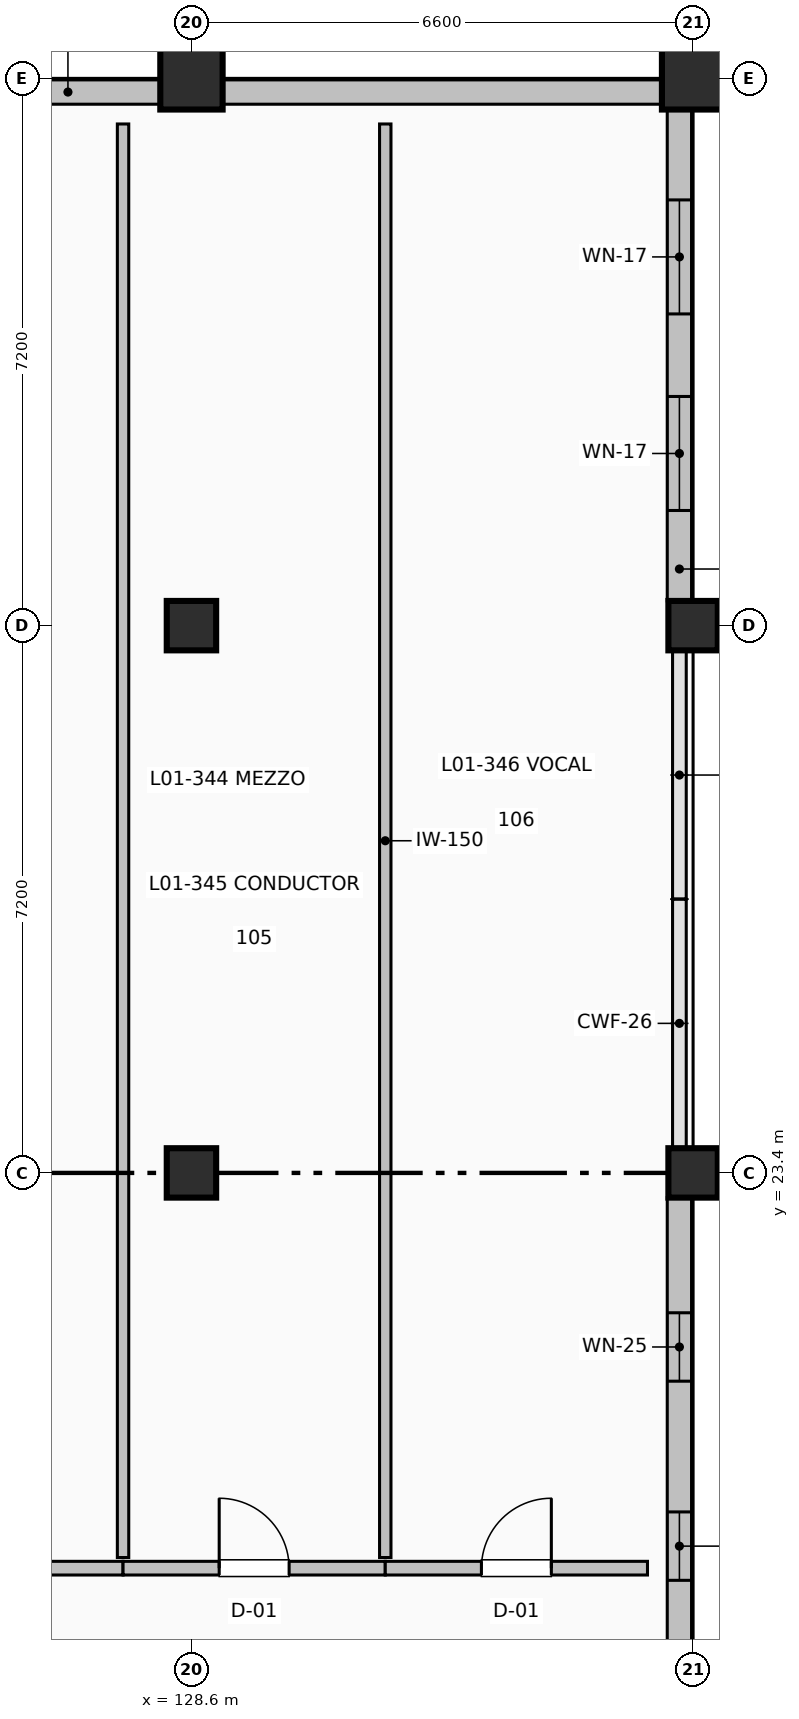
"""IFC4 building model, lengths in metres.
Left out: names, types, materials, properties, quantities, classifications, styles, units other than length and angle.
Written with IfcOpenShell. Run it as: python <this file> out.ifc"""

import sys

from ifc_helpers import new_model, si_unit, direction, frame, frame_2d, origin, origin_2d, place, context, subcontext, project, spatial, rectangle, extrude, element, fill, save


model = new_model("IFC4")
c1 = context("Model", 3, precision=1e-05, world=origin(), true_north=direction((0.0, 1.0)))
c2 = subcontext(c1, "Body", "Model", "MODEL_VIEW")
j1 = project(units=[si_unit("LENGTHUNIT", "METRE"), si_unit("PLANEANGLEUNIT", "RADIAN")], contexts=[c1])
p1 = place(None, origin())
s1 = spatial("IfcSite", under=j1, at=p1, CompositionType="ELEMENT")
p2 = place(p1, origin())
s2 = spatial("IfcBuilding", under=s1, at=p2, CompositionType="ELEMENT")
p3 = place(p2, frame((0.0, 0.0, 5.4)))
s3 = spatial("IfcBuildingStorey", under=s2, at=p3, CompositionType="ELEMENT", Elevation=5.4)
for number, where, z_axis, x_axis in (
    (1, (128.6, 23.4, 0.0), (0.0, 0.0, 1.0), (1.0, 0.0, 0.0)),
    (2, (128.6, 30.6, 0.0), (0.0, 0.0, 1.0), (1.0, 0.0, 0.0)),
):
    element("IfcColumn", number, at=place(p3, frame(where, z_axis=z_axis, x_axis=x_axis)), inside=s3, PredefinedType="COLUMN", context=c2, shape_type="SweptSolid", body=[
        extrude(rectangle(XDim=0.65, YDim=0.65, at=origin_2d()), origin(), (0.0, 0.0, 1.0), 4.8),
    ])
p4 = place(p3, frame((128.6, 37.8, 0.0), z_axis=(0.0, 0.0, 1.0), x_axis=(1.0, 0.0, 0.0)))
e3 = element("IfcColumn", 3, at=p4, inside=s3, PredefinedType="COLUMN", context=c2, shape_type="SweptSolid", body=[
    extrude(rectangle(XDim=0.82, YDim=0.82, at=origin_2d()), origin(), (0.0, 0.0, 1.0), 4.8),
])
for number, where, z_axis, x_axis in (
    (4, (135.2, 23.4, 0.0), (0.0, 0.0, 1.0), (1.0, 0.0, 0.0)),
    (5, (135.2, 30.6, 0.0), (0.0, 0.0, 1.0), (1.0, 0.0, 0.0)),
):
    element("IfcColumn", number, at=place(p3, frame(where, z_axis=z_axis, x_axis=x_axis)), inside=s3, PredefinedType="COLUMN", context=c2, shape_type="SweptSolid", body=[
        extrude(rectangle(XDim=0.65, YDim=0.65, at=origin_2d()), origin(), (0.0, 0.0, 1.0), 4.8),
    ])
p5 = place(p3, frame((135.2, 37.8, 0.0), z_axis=(0.0, 0.0, 1.0), x_axis=(1.0, 0.0, 0.0)))
e6 = element("IfcColumn", 6, at=p5, inside=s3, PredefinedType="COLUMN", context=c2, shape_type="SweptSolid", body=[
    extrude(rectangle(XDim=0.82, YDim=0.82, at=origin_2d()), origin(), (0.0, 0.0, 1.0), 4.8),
])
p6 = place(p3, frame((135.02, 37.39, 0.0), z_axis=(0.0, 0.0, 1.0), x_axis=(0.0, -1.0, 0.0)))
e7 = element("IfcWall", 7, at=p6, inside=s3, PredefinedType="SOLIDWALL", context=c2, shape_type="SweptSolid", body=[
    extrude(rectangle(XDim=6.465, YDim=0.32, at=frame_2d((3.232, 0.0))), origin(), (0.0, 0.0, 1.0), 3.742),
])
p7 = place(p6, frame((1.189, 0.0, 1.0)))
e8 = element("IfcOpeningElement", 8, at=p7, cuts=e7, PredefinedType="OPENING", context=c2, shape_type="SweptSolid", body=[
    extrude(rectangle(XDim=1.5, YDim=1.7, at=frame_2d((0.75, 0.85))), frame((0.0, 0.17, 0.0), z_axis=(0.0, -1.0, 0.0), x_axis=(1.0, 0.0, 0.0)), (0.0, 0.0, 1.0), 0.34),
])
p8 = place(p6, frame((3.775, 0.0, 1.0)))
e9 = element("IfcOpeningElement", 9, at=p8, cuts=e7, PredefinedType="OPENING", context=c2, shape_type="SweptSolid", body=[
    extrude(rectangle(XDim=1.5, YDim=1.7, at=frame_2d((0.75, 0.85))), frame((0.0, 0.17, 0.0), z_axis=(0.0, -1.0, 0.0), x_axis=(1.0, 0.0, 0.0)), (0.0, 0.0, 1.0), 0.34),
])
p9 = place(p3, frame((135.02, 23.075, 0.0), z_axis=(0.0, 0.0, 1.0), x_axis=(0.0, -1.0, 0.0)))
e10 = element("IfcWall", 10, at=p9, inside=s3, PredefinedType="SOLIDWALL", context=c2, shape_type="SweptSolid", body=[
    extrude(rectangle(XDim=6.55, YDim=0.32, at=frame_2d((3.275, 0.0))), origin(), (0.0, 0.0, 1.0), 3.742),
])
p10 = place(p9, frame((1.515, 0.0, 1.0)))
e11 = element("IfcOpeningElement", 11, at=p10, cuts=e10, PredefinedType="OPENING", context=c2, shape_type="SweptSolid", body=[
    extrude(rectangle(XDim=0.9, YDim=1.4, at=frame_2d((0.45, 0.7))), frame((0.0, 0.17, 0.0), z_axis=(0.0, -1.0, 0.0), x_axis=(1.0, 0.0, 0.0)), (0.0, 0.0, 1.0), 0.34),
])
p11 = place(p9, frame((4.135, 0.0, 1.0)))
e12 = element("IfcOpeningElement", 12, at=p11, cuts=e10, PredefinedType="OPENING", context=c2, shape_type="SweptSolid", body=[
    extrude(rectangle(XDim=0.9, YDim=1.4, at=frame_2d((0.45, 0.7))), frame((0.0, 0.17, 0.0), z_axis=(0.0, -1.0, 0.0), x_axis=(1.0, 0.0, 0.0)), (0.0, 0.0, 1.0), 0.34),
])
for number, where, z_axis, x_axis in (
    (13, (122.41, 37.62, 0.0), (0.0, 0.0, 1.0), (1.0, 0.0, 0.0)),
    (14, (129.01, 37.62, 0.0), (0.0, 0.0, 1.0), (1.0, 0.0, 0.0)),
):
    element("IfcWall", number, at=place(p3, frame(where, z_axis=z_axis, x_axis=x_axis)), inside=s3, PredefinedType="SOLIDWALL", context=c2, shape_type="SweptSolid", body=[
        extrude(rectangle(XDim=5.78, YDim=0.32, at=frame_2d((2.89, 0.0))), origin(), (0.0, 0.0, 1.0), 3.742),
    ])
p12 = place(p3, frame((124.25, 18.2, 0.0), z_axis=(0.0, 0.0, 1.0), x_axis=(1.0, 0.0, 0.0)))
e15 = element("IfcWall", 15, at=p12, inside=s3, PredefinedType="PARTITIONING", context=c2, shape_type="SweptSolid", body=[
    extrude(rectangle(XDim=3.45, YDim=0.18, at=frame_2d((1.725, 0.0))), origin(), (0.0, 0.0, 1.0), 4.492),
])
p13 = place(p12, frame((1.265, 0.0, 0.0)))
e16 = element("IfcOpeningElement", 16, at=p13, cuts=e15, PredefinedType="OPENING", context=c2, shape_type="SweptSolid", body=[
    extrude(rectangle(XDim=0.92, YDim=2.05, at=frame_2d((0.46, 1.025))), frame((0.0, 0.1, 0.0), z_axis=(0.0, -1.0, 0.0), x_axis=(1.0, 0.0, 0.0)), (0.0, 0.0, 1.0), 0.2),
])
p14 = place(p3, frame((127.7, 18.34, 0.0), z_axis=(0.0, 0.0, 1.0), x_axis=(0.0, 1.0, 0.0)))
e17 = element("IfcWall", 17, at=p14, inside=s3, PredefinedType="PARTITIONING", context=c2, shape_type="SweptSolid", body=[
    extrude(rectangle(XDim=18.86, YDim=0.15, at=frame_2d((9.43, 0.0))), origin(), (0.0, 0.0, 1.0), 4.492),
])
p15 = place(p3, frame((127.7, 18.2, 0.0), z_axis=(0.0, 0.0, 1.0), x_axis=(1.0, 0.0, 0.0)))
e18 = element("IfcWall", 18, at=p15, inside=s3, PredefinedType="PARTITIONING", context=c2, shape_type="SweptSolid", body=[
    extrude(rectangle(XDim=3.45, YDim=0.18, at=frame_2d((1.725, 0.0))), origin(), (0.0, 0.0, 1.0), 4.492),
])
p16 = place(p15, frame((1.265, 0.0, 0.0)))
e19 = element("IfcOpeningElement", 19, at=p16, cuts=e18, PredefinedType="OPENING", context=c2, shape_type="SweptSolid", body=[
    extrude(rectangle(XDim=0.92, YDim=2.05, at=frame_2d((0.46, 1.025))), frame((0.0, 0.1, 0.0), z_axis=(0.0, -1.0, 0.0), x_axis=(1.0, 0.0, 0.0)), (0.0, 0.0, 1.0), 0.2),
])
p17 = place(p3, frame((131.15, 18.34, 0.0), z_axis=(0.0, 0.0, 1.0), x_axis=(0.0, 1.0, 0.0)))
e20 = element("IfcWall", 20, at=p17, inside=s3, PredefinedType="PARTITIONING", context=c2, shape_type="SweptSolid", body=[
    extrude(rectangle(XDim=18.86, YDim=0.15, at=frame_2d((9.43, 0.0))), origin(), (0.0, 0.0, 1.0), 4.492),
])
p18 = place(p3, frame((131.15, 18.2, 0.0), z_axis=(0.0, 0.0, 1.0), x_axis=(1.0, 0.0, 0.0)))
e21 = element("IfcWall", 21, at=p18, inside=s3, PredefinedType="PARTITIONING", context=c2, shape_type="SweptSolid", body=[
    extrude(rectangle(XDim=3.45, YDim=0.18, at=frame_2d((1.725, 0.0))), origin(), (0.0, 0.0, 1.0), 4.492),
])
p19 = place(p18, frame((1.265, 0.0, 0.0)))
e22 = element("IfcOpeningElement", 22, at=p19, cuts=e21, PredefinedType="OPENING", context=c2, shape_type="SweptSolid", body=[
    extrude(rectangle(XDim=0.92, YDim=2.05, at=frame_2d((0.46, 1.025))), frame((0.0, 0.1, 0.0), z_axis=(0.0, -1.0, 0.0), x_axis=(1.0, 0.0, 0.0)), (0.0, 0.0, 1.0), 0.2),
])
p20 = place(p7, origin())
e23 = element("IfcWindow", 23, at=p20, inside=s3, PartitioningType="SINGLE_PANEL", PredefinedType="WINDOW", context=c2, shape_type="SweptSolid", body=[
    extrude(rectangle(XDim=1.5, YDim=1.7, at=frame_2d((0.75, 0.85))), frame((0.0, 0.03, 0.0), z_axis=(0.0, -1.0, 0.0), x_axis=(1.0, 0.0, 0.0)), (0.0, 0.0, 1.0), 0.06),
])
fill(e8, e23)
p21 = place(p8, origin())
e24 = element("IfcWindow", 24, at=p21, inside=s3, PartitioningType="SINGLE_PANEL", PredefinedType="WINDOW", context=c2, shape_type="SweptSolid", body=[
    extrude(rectangle(XDim=1.5, YDim=1.7, at=frame_2d((0.75, 0.85))), frame((0.0, 0.03, 0.0), z_axis=(0.0, -1.0, 0.0), x_axis=(1.0, 0.0, 0.0)), (0.0, 0.0, 1.0), 0.06),
])
fill(e9, e24)
p22 = place(p10, origin())
e25 = element("IfcWindow", 25, at=p22, inside=s3, PartitioningType="SINGLE_PANEL", PredefinedType="WINDOW", context=c2, shape_type="SweptSolid", body=[
    extrude(rectangle(XDim=0.9, YDim=1.4, at=frame_2d((0.45, 0.7))), frame((0.0, 0.03, 0.0), z_axis=(0.0, -1.0, 0.0), x_axis=(1.0, 0.0, 0.0)), (0.0, 0.0, 1.0), 0.06),
])
fill(e11, e25)
p23 = place(p11, origin())
e26 = element("IfcWindow", 26, at=p23, inside=s3, PartitioningType="SINGLE_PANEL", PredefinedType="WINDOW", context=c2, shape_type="SweptSolid", body=[
    extrude(rectangle(XDim=0.9, YDim=1.4, at=frame_2d((0.45, 0.7))), frame((0.0, 0.03, 0.0), z_axis=(0.0, -1.0, 0.0), x_axis=(1.0, 0.0, 0.0)), (0.0, 0.0, 1.0), 0.06),
])
fill(e12, e26)
p24 = place(p16, origin())
e27 = element("IfcDoor", 27, at=p24, inside=s3, OperationType="SINGLE_SWING_LEFT", PredefinedType="DOOR", context=c2, shape_type="SweptSolid", body=[
    extrude(rectangle(XDim=0.92, YDim=2.05, at=frame_2d((0.46, 1.025))), frame((0.0, 0.025, 0.0), z_axis=(0.0, -1.0, 0.0), x_axis=(1.0, 0.0, 0.0)), (0.0, 0.0, 1.0), 0.05),
])
fill(e19, e27)
p25 = place(p19, origin())
e28 = element("IfcDoor", 28, at=p25, inside=s3, OperationType="SINGLE_SWING_RIGHT", PredefinedType="DOOR", context=c2, shape_type="SweptSolid", body=[
    extrude(rectangle(XDim=0.92, YDim=2.05, at=frame_2d((0.46, 1.025))), frame((0.0, 0.025, 0.0), z_axis=(0.0, -1.0, 0.0), x_axis=(1.0, 0.0, 0.0)), (0.0, 0.0, 1.0), 0.05),
])
fill(e22, e28)
save(model, sys.argv[1])
